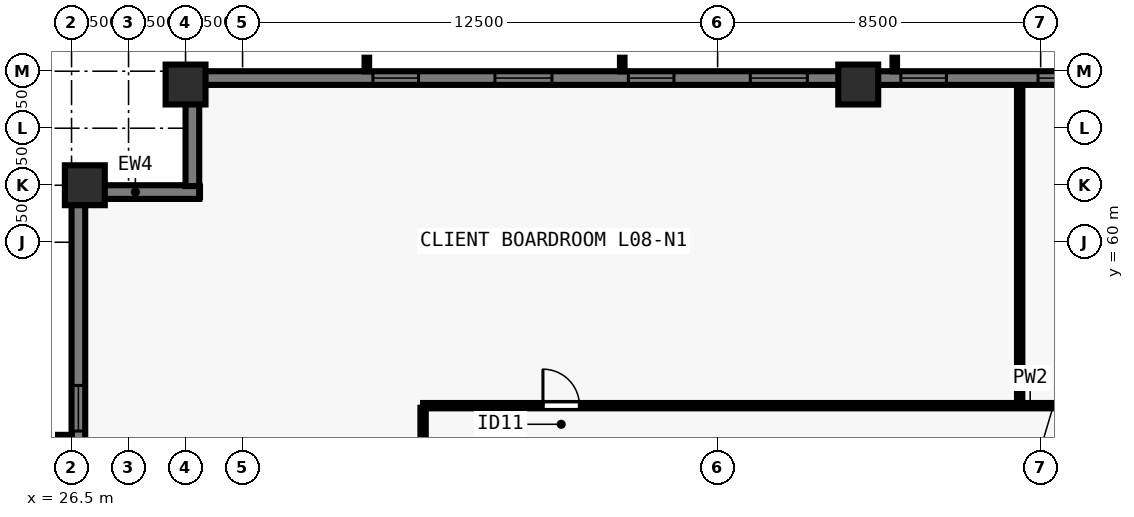
"""IFC4 building model, lengths in metres.
Left out: names, types, materials, properties, quantities, classifications, styles, units other than length and angle.
Written with IfcOpenShell. Run it as: python <this file> out.ifc"""

import sys

from ifc_helpers import new_model, si_unit, direction, frame, frame_2d, origin, origin_2d, place, context, subcontext, project, spatial, rectangle, extrude, element, fill, save


model = new_model("IFC4")
c1 = context("Model", 3, precision=1e-05, world=origin(), true_north=direction((0.0, 1.0)))
c2 = subcontext(c1, "Body", "Model", "MODEL_VIEW")
j1 = project(units=[si_unit("LENGTHUNIT", "METRE"), si_unit("PLANEANGLEUNIT", "RADIAN")], contexts=[c1])
p1 = place(None, origin())
s1 = spatial("IfcSite", under=j1, at=p1, CompositionType="ELEMENT")
p2 = place(p1, origin())
s2 = spatial("IfcBuilding", under=s1, at=p2, CompositionType="ELEMENT")
p3 = place(p2, frame((0.0, 0.0, 34.0)))
s3 = spatial("IfcBuildingStorey", under=s2, at=p3, CompositionType="ELEMENT", Elevation=34.0)
for number, where, z_axis, x_axis in (
    (1, (47.2, 64.15, 0.0), (0.0, 0.0, 1.0), (1.0, 0.0, 0.0)),
    (2, (29.5, 64.15, 0.0), (0.0, 0.0, 1.0), (1.0, 0.0, 0.0)),
    (3, (26.85, 61.5, 0.0), (0.0, 0.0, 1.0), (0.0, 1.0, 0.0)),
):
    element("IfcColumn", number, at=place(p3, frame(where, z_axis=z_axis, x_axis=x_axis)), inside=s3, PredefinedType="COLUMN", context=c2, shape_type="SweptSolid", body=[
        extrude(rectangle(XDim=1.05, YDim=1.05, at=origin_2d()), origin(), (0.0, 0.0, 1.0), 3.5),
    ])
p4 = place(p3, frame((26.68, 16.5, 0.0), z_axis=(0.0, 0.0, 1.0), x_axis=(0.0, 1.0, 0.0)))
e4 = element("IfcWall", 4, at=p4, inside=s3, PredefinedType="SOLIDWALL", context=c2, shape_type="SweptSolid", body=[
    extrude(rectangle(XDim=44.662, YDim=0.36, at=frame_2d((22.331, 0.0))), origin(), (0.0, 0.0, 1.0), 3.28),
])
p5 = place(p4, frame((4.93, 0.0, 0.8)))
e5 = element("IfcOpeningElement", 5, at=p5, cuts=e4, PredefinedType="OPENING", context=c2, shape_type="SweptSolid", body=[
    extrude(rectangle(XDim=1.2, YDim=1.544, at=frame_2d((0.6, 0.772))), frame((0.0, 0.19, 0.0), z_axis=(0.0, -1.0, 0.0), x_axis=(1.0, 0.0, 0.0)), (0.0, 0.0, 1.0), 0.38),
])
p6 = place(p4, frame((8.14, 0.0, 0.8)))
e6 = element("IfcOpeningElement", 6, at=p6, cuts=e4, PredefinedType="OPENING", context=c2, shape_type="SweptSolid", body=[
    extrude(rectangle(XDim=1.5, YDim=1.544, at=frame_2d((0.75, 0.772))), frame((0.0, 0.19, 0.0), z_axis=(0.0, -1.0, 0.0), x_axis=(1.0, 0.0, 0.0)), (0.0, 0.0, 1.0), 0.38),
])
p7 = place(p4, frame((11.65, 0.0, 0.8)))
e7 = element("IfcOpeningElement", 7, at=p7, cuts=e4, PredefinedType="OPENING", context=c2, shape_type="SweptSolid", body=[
    extrude(rectangle(XDim=1.2, YDim=1.544, at=frame_2d((0.6, 0.772))), frame((0.0, 0.19, 0.0), z_axis=(0.0, -1.0, 0.0), x_axis=(1.0, 0.0, 0.0)), (0.0, 0.0, 1.0), 0.38),
])
p8 = place(p4, frame((14.861, 0.0, 0.8)))
e8 = element("IfcOpeningElement", 8, at=p8, cuts=e4, PredefinedType="OPENING", context=c2, shape_type="SweptSolid", body=[
    extrude(rectangle(XDim=1.5, YDim=1.544, at=frame_2d((0.75, 0.772))), frame((0.0, 0.19, 0.0), z_axis=(0.0, -1.0, 0.0), x_axis=(1.0, 0.0, 0.0)), (0.0, 0.0, 1.0), 0.38),
])
p9 = place(p4, frame((18.821, 0.0, 0.8)))
e9 = element("IfcOpeningElement", 9, at=p9, cuts=e4, PredefinedType="OPENING", context=c2, shape_type="SweptSolid", body=[
    extrude(rectangle(XDim=1.2, YDim=1.544, at=frame_2d((0.6, 0.772))), frame((0.0, 0.19, 0.0), z_axis=(0.0, -1.0, 0.0), x_axis=(1.0, 0.0, 0.0)), (0.0, 0.0, 1.0), 0.38),
])
p10 = place(p4, frame((20.731, 0.0, 0.8)))
e10 = element("IfcOpeningElement", 10, at=p10, cuts=e4, PredefinedType="OPENING", context=c2, shape_type="SweptSolid", body=[
    extrude(rectangle(XDim=1.5, YDim=1.544, at=frame_2d((0.75, 0.772))), frame((0.0, 0.19, 0.0), z_axis=(0.0, -1.0, 0.0), x_axis=(1.0, 0.0, 0.0)), (0.0, 0.0, 1.0), 0.38),
])
p11 = place(p4, frame((25.091, 0.0, 0.8)))
e11 = element("IfcOpeningElement", 11, at=p11, cuts=e4, PredefinedType="OPENING", context=c2, shape_type="SweptSolid", body=[
    extrude(rectangle(XDim=1.2, YDim=1.544, at=frame_2d((0.6, 0.772))), frame((0.0, 0.19, 0.0), z_axis=(0.0, -1.0, 0.0), x_axis=(1.0, 0.0, 0.0)), (0.0, 0.0, 1.0), 0.38),
])
p12 = place(p4, frame((28.302, 0.0, 0.8)))
e12 = element("IfcOpeningElement", 12, at=p12, cuts=e4, PredefinedType="OPENING", context=c2, shape_type="SweptSolid", body=[
    extrude(rectangle(XDim=1.5, YDim=1.544, at=frame_2d((0.75, 0.772))), frame((0.0, 0.19, 0.0), z_axis=(0.0, -1.0, 0.0), x_axis=(1.0, 0.0, 0.0)), (0.0, 0.0, 1.0), 0.38),
])
p13 = place(p4, frame((31.812, 0.0, 0.8)))
e13 = element("IfcOpeningElement", 13, at=p13, cuts=e4, PredefinedType="OPENING", context=c2, shape_type="SweptSolid", body=[
    extrude(rectangle(XDim=1.2, YDim=1.544, at=frame_2d((0.6, 0.772))), frame((0.0, 0.19, 0.0), z_axis=(0.0, -1.0, 0.0), x_axis=(1.0, 0.0, 0.0)), (0.0, 0.0, 1.0), 0.38),
])
p14 = place(p4, frame((35.022, 0.0, 0.8)))
e14 = element("IfcOpeningElement", 14, at=p14, cuts=e4, PredefinedType="OPENING", context=c2, shape_type="SweptSolid", body=[
    extrude(rectangle(XDim=1.5, YDim=1.544, at=frame_2d((0.75, 0.772))), frame((0.0, 0.19, 0.0), z_axis=(0.0, -1.0, 0.0), x_axis=(1.0, 0.0, 0.0)), (0.0, 0.0, 1.0), 0.38),
])
p15 = place(p4, frame((38.532, 0.0, 0.8)))
e15 = element("IfcOpeningElement", 15, at=p15, cuts=e4, PredefinedType="OPENING", context=c2, shape_type="SweptSolid", body=[
    extrude(rectangle(XDim=1.2, YDim=1.544, at=frame_2d((0.6, 0.772))), frame((0.0, 0.19, 0.0), z_axis=(0.0, -1.0, 0.0), x_axis=(1.0, 0.0, 0.0)), (0.0, 0.0, 1.0), 0.38),
])
p16 = place(p3, frame((26.5, 61.32, 0.0), z_axis=(0.0, 0.0, 1.0), x_axis=(1.0, 0.0, 0.0)))
e16 = element("IfcWall", 16, at=p16, inside=s3, PredefinedType="SOLIDWALL", context=c2, shape_type="SweptSolid", body=[
    extrude(rectangle(XDim=3.36, YDim=0.36, at=frame_2d((1.68, 0.0))), origin(), (0.0, 0.0, 1.0), 3.28),
])
p17 = place(p3, frame((29.68, 61.478, 0.0), z_axis=(0.0, 0.0, 1.0), x_axis=(0.0, 1.0, 0.0)))
e17 = element("IfcWall", 17, at=p17, inside=s3, PredefinedType="SOLIDWALL", context=c2, shape_type="SweptSolid", body=[
    extrude(rectangle(XDim=2.684, YDim=0.36, at=frame_2d((1.342, 0.0))), origin(), (0.0, 0.0, 1.0), 3.28),
])
p18 = place(p3, frame((29.5, 64.32, 0.0), z_axis=(0.0, 0.0, 1.0), x_axis=(1.0, 0.0, 0.0)))
e18 = element("IfcWall", 18, at=p18, inside=s3, PredefinedType="SOLIDWALL", context=c2, shape_type="SweptSolid", body=[
    extrude(rectangle(XDim=44.662, YDim=0.36, at=frame_2d((22.331, 0.0))), origin(), (0.0, 0.0, 1.0), 3.28),
])
p19 = place(p18, frame((4.93, 0.0, 0.8)))
e19 = element("IfcOpeningElement", 19, at=p19, cuts=e18, PredefinedType="OPENING", context=c2, shape_type="SweptSolid", body=[
    extrude(rectangle(XDim=1.2, YDim=1.544, at=frame_2d((0.6, 0.772))), frame((0.0, 0.19, 0.0), z_axis=(0.0, -1.0, 0.0), x_axis=(1.0, 0.0, 0.0)), (0.0, 0.0, 1.0), 0.38),
])
p20 = place(p18, frame((8.14, 0.0, 0.8)))
e20 = element("IfcOpeningElement", 20, at=p20, cuts=e18, PredefinedType="OPENING", context=c2, shape_type="SweptSolid", body=[
    extrude(rectangle(XDim=1.5, YDim=1.544, at=frame_2d((0.75, 0.772))), frame((0.0, 0.19, 0.0), z_axis=(0.0, -1.0, 0.0), x_axis=(1.0, 0.0, 0.0)), (0.0, 0.0, 1.0), 0.38),
])
p21 = place(p18, frame((11.65, 0.0, 0.8)))
e21 = element("IfcOpeningElement", 21, at=p21, cuts=e18, PredefinedType="OPENING", context=c2, shape_type="SweptSolid", body=[
    extrude(rectangle(XDim=1.2, YDim=1.544, at=frame_2d((0.6, 0.772))), frame((0.0, 0.19, 0.0), z_axis=(0.0, -1.0, 0.0), x_axis=(1.0, 0.0, 0.0)), (0.0, 0.0, 1.0), 0.38),
])
p22 = place(p18, frame((14.861, 0.0, 0.8)))
e22 = element("IfcOpeningElement", 22, at=p22, cuts=e18, PredefinedType="OPENING", context=c2, shape_type="SweptSolid", body=[
    extrude(rectangle(XDim=1.5, YDim=1.544, at=frame_2d((0.75, 0.772))), frame((0.0, 0.19, 0.0), z_axis=(0.0, -1.0, 0.0), x_axis=(1.0, 0.0, 0.0)), (0.0, 0.0, 1.0), 0.38),
])
p23 = place(p18, frame((18.821, 0.0, 0.8)))
e23 = element("IfcOpeningElement", 23, at=p23, cuts=e18, PredefinedType="OPENING", context=c2, shape_type="SweptSolid", body=[
    extrude(rectangle(XDim=1.2, YDim=1.544, at=frame_2d((0.6, 0.772))), frame((0.0, 0.19, 0.0), z_axis=(0.0, -1.0, 0.0), x_axis=(1.0, 0.0, 0.0)), (0.0, 0.0, 1.0), 0.38),
])
p24 = place(p18, frame((22.431, 0.0, 0.8)))
e24 = element("IfcOpeningElement", 24, at=p24, cuts=e18, PredefinedType="OPENING", context=c2, shape_type="SweptSolid", body=[
    extrude(rectangle(XDim=1.5, YDim=1.544, at=frame_2d((0.75, 0.772))), frame((0.0, 0.19, 0.0), z_axis=(0.0, -1.0, 0.0), x_axis=(1.0, 0.0, 0.0)), (0.0, 0.0, 1.0), 0.38),
])
p25 = place(p18, frame((25.091, 0.0, 0.8)))
e25 = element("IfcOpeningElement", 25, at=p25, cuts=e18, PredefinedType="OPENING", context=c2, shape_type="SweptSolid", body=[
    extrude(rectangle(XDim=1.2, YDim=1.544, at=frame_2d((0.6, 0.772))), frame((0.0, 0.19, 0.0), z_axis=(0.0, -1.0, 0.0), x_axis=(1.0, 0.0, 0.0)), (0.0, 0.0, 1.0), 0.38),
])
p26 = place(p18, frame((28.302, 0.0, 0.8)))
e26 = element("IfcOpeningElement", 26, at=p26, cuts=e18, PredefinedType="OPENING", context=c2, shape_type="SweptSolid", body=[
    extrude(rectangle(XDim=1.5, YDim=1.544, at=frame_2d((0.75, 0.772))), frame((0.0, 0.19, 0.0), z_axis=(0.0, -1.0, 0.0), x_axis=(1.0, 0.0, 0.0)), (0.0, 0.0, 1.0), 0.38),
])
p27 = place(p18, frame((31.812, 0.0, 0.8)))
e27 = element("IfcOpeningElement", 27, at=p27, cuts=e18, PredefinedType="OPENING", context=c2, shape_type="SweptSolid", body=[
    extrude(rectangle(XDim=1.2, YDim=1.544, at=frame_2d((0.6, 0.772))), frame((0.0, 0.19, 0.0), z_axis=(0.0, -1.0, 0.0), x_axis=(1.0, 0.0, 0.0)), (0.0, 0.0, 1.0), 0.38),
])
p28 = place(p18, frame((35.022, 0.0, 0.8)))
e28 = element("IfcOpeningElement", 28, at=p28, cuts=e18, PredefinedType="OPENING", context=c2, shape_type="SweptSolid", body=[
    extrude(rectangle(XDim=1.5, YDim=1.544, at=frame_2d((0.75, 0.772))), frame((0.0, 0.19, 0.0), z_axis=(0.0, -1.0, 0.0), x_axis=(1.0, 0.0, 0.0)), (0.0, 0.0, 1.0), 0.38),
])
p29 = place(p18, frame((38.532, 0.0, 0.8)))
e29 = element("IfcOpeningElement", 29, at=p29, cuts=e18, PredefinedType="OPENING", context=c2, shape_type="SweptSolid", body=[
    extrude(rectangle(XDim=1.2, YDim=1.544, at=frame_2d((0.6, 0.772))), frame((0.0, 0.19, 0.0), z_axis=(0.0, -1.0, 0.0), x_axis=(1.0, 0.0, 0.0)), (0.0, 0.0, 1.0), 0.38),
])
p30 = place(p3, frame((35.75, 55.7, 0.0), z_axis=(0.0, 0.0, 1.0), x_axis=(1.0, 0.0, 0.0)))
e30 = element("IfcWall", 30, at=p30, inside=s3, PredefinedType="PARTITIONING", context=c2, shape_type="SweptSolid", body=[
    extrude(rectangle(XDim=32.5, YDim=0.14, at=frame_2d((16.25, 0.0))), origin(), (0.0, 0.0, 1.0), 3.28),
])
p31 = place(p30, frame((3.154, 0.0, 0.0)))
e31 = element("IfcOpeningElement", 31, at=p31, cuts=e30, PredefinedType="OPENING", context=c2, shape_type="SweptSolid", body=[
    extrude(rectangle(XDim=0.96, YDim=2.12, at=frame_2d((0.48, 1.06))), frame((0.0, 0.08, 0.0), z_axis=(0.0, -1.0, 0.0), x_axis=(1.0, 0.0, 0.0)), (0.0, 0.0, 1.0), 0.16),
])
p32 = place(p30, frame((27.834, 0.0, 0.0)))
e32 = element("IfcOpeningElement", 32, at=p32, cuts=e30, PredefinedType="OPENING", context=c2, shape_type="SweptSolid", body=[
    extrude(rectangle(XDim=0.96, YDim=2.12, at=frame_2d((0.48, 1.06))), frame((0.0, 0.08, 0.0), z_axis=(0.0, -1.0, 0.0), x_axis=(1.0, 0.0, 0.0)), (0.0, 0.0, 1.0), 0.16),
])
p33 = place(p3, frame((35.75, 22.355, 0.0), z_axis=(0.0, 0.0, 1.0), x_axis=(0.0, 1.0, 0.0)))
e33 = element("IfcWall", 33, at=p33, inside=s3, PredefinedType="PARTITIONING", context=c2, shape_type="SweptSolid", body=[
    extrude(rectangle(XDim=33.29, YDim=0.14, at=frame_2d((16.645, 0.0))), origin(), (0.0, 0.0, 1.0), 3.28),
])
p34 = place(p33, frame((8.058, 0.0, 0.0)))
e34 = element("IfcOpeningElement", 34, at=p34, cuts=e33, PredefinedType="OPENING", context=c2, shape_type="SweptSolid", body=[
    extrude(rectangle(XDim=0.96, YDim=2.12, at=frame_2d((0.48, 1.06))), frame((0.0, 0.08, 0.0), z_axis=(0.0, -1.0, 0.0), x_axis=(1.0, 0.0, 0.0)), (0.0, 0.0, 1.0), 0.16),
])
p35 = place(p33, frame((24.658, 0.0, 0.0)))
e35 = element("IfcOpeningElement", 35, at=p35, cuts=e33, PredefinedType="OPENING", context=c2, shape_type="SweptSolid", body=[
    extrude(rectangle(XDim=0.96, YDim=2.12, at=frame_2d((0.48, 1.06))), frame((0.0, 0.08, 0.0), z_axis=(0.0, -1.0, 0.0), x_axis=(1.0, 0.0, 0.0)), (0.0, 0.0, 1.0), 0.16),
])
p36 = place(p3, frame((51.448, 55.8, 0.0), z_axis=(0.0, 0.0, 1.0), x_axis=(0.0, 1.0, 0.0)))
e36 = element("IfcWall", 36, at=p36, inside=s3, PredefinedType="PARTITIONING", context=c2, shape_type="SweptSolid", body=[
    extrude(rectangle(XDim=8.28, YDim=0.14, at=frame_2d((4.14, 0.0))), origin(), (0.0, 0.0, 1.0), 3.28),
])
p37 = place(p15, origin())
e37 = element("IfcWindow", 37, at=p37, inside=s3, PartitioningType="SINGLE_PANEL", PredefinedType="WINDOW", context=c2, shape_type="SweptSolid", body=[
    extrude(rectangle(XDim=1.2, YDim=1.544, at=frame_2d((0.6, 0.772))), frame((0.0, -0.05, 0.0), z_axis=(0.0, -1.0, 0.0), x_axis=(1.0, 0.0, 0.0)), (0.0, 0.0, 1.0), 0.06),
])
fill(e15, e37)
p38 = place(p19, origin())
e38 = element("IfcWindow", 38, at=p38, inside=s3, PartitioningType="SINGLE_PANEL", PredefinedType="WINDOW", context=c2, shape_type="SweptSolid", body=[
    extrude(rectangle(XDim=1.2, YDim=1.544, at=frame_2d((0.6, 0.772))), frame((0.0, -0.05, 0.0), z_axis=(0.0, -1.0, 0.0), x_axis=(1.0, 0.0, 0.0)), (0.0, 0.0, 1.0), 0.06),
])
fill(e19, e38)
p39 = place(p20, origin())
e39 = element("IfcWindow", 39, at=p39, inside=s3, PartitioningType="SINGLE_PANEL", PredefinedType="WINDOW", context=c2, shape_type="SweptSolid", body=[
    extrude(rectangle(XDim=1.5, YDim=1.544, at=frame_2d((0.75, 0.772))), frame((0.0, -0.05, 0.0), z_axis=(0.0, -1.0, 0.0), x_axis=(1.0, 0.0, 0.0)), (0.0, 0.0, 1.0), 0.06),
])
fill(e20, e39)
p40 = place(p21, origin())
e40 = element("IfcWindow", 40, at=p40, inside=s3, PartitioningType="SINGLE_PANEL", PredefinedType="WINDOW", context=c2, shape_type="SweptSolid", body=[
    extrude(rectangle(XDim=1.2, YDim=1.544, at=frame_2d((0.6, 0.772))), frame((0.0, -0.05, 0.0), z_axis=(0.0, -1.0, 0.0), x_axis=(1.0, 0.0, 0.0)), (0.0, 0.0, 1.0), 0.06),
])
fill(e21, e40)
p41 = place(p22, origin())
e41 = element("IfcWindow", 41, at=p41, inside=s3, PartitioningType="SINGLE_PANEL", PredefinedType="WINDOW", context=c2, shape_type="SweptSolid", body=[
    extrude(rectangle(XDim=1.5, YDim=1.544, at=frame_2d((0.75, 0.772))), frame((0.0, -0.05, 0.0), z_axis=(0.0, -1.0, 0.0), x_axis=(1.0, 0.0, 0.0)), (0.0, 0.0, 1.0), 0.06),
])
fill(e22, e41)
p42 = place(p23, origin())
e42 = element("IfcWindow", 42, at=p42, inside=s3, PartitioningType="SINGLE_PANEL", PredefinedType="WINDOW", context=c2, shape_type="SweptSolid", body=[
    extrude(rectangle(XDim=1.2, YDim=1.544, at=frame_2d((0.6, 0.772))), frame((0.0, -0.05, 0.0), z_axis=(0.0, -1.0, 0.0), x_axis=(1.0, 0.0, 0.0)), (0.0, 0.0, 1.0), 0.06),
])
fill(e23, e42)
p43 = place(p24, origin())
e43 = element("IfcWindow", 43, at=p43, inside=s3, PartitioningType="SINGLE_PANEL", PredefinedType="WINDOW", context=c2, shape_type="SweptSolid", body=[
    extrude(rectangle(XDim=1.5, YDim=1.544, at=frame_2d((0.75, 0.772))), frame((0.0, -0.05, 0.0), z_axis=(0.0, -1.0, 0.0), x_axis=(1.0, 0.0, 0.0)), (0.0, 0.0, 1.0), 0.06),
])
fill(e24, e43)
p44 = place(p31, origin())
e44 = element("IfcDoor", 44, at=p44, inside=s3, OperationType="SINGLE_SWING_LEFT", PredefinedType="DOOR", context=c2, shape_type="SweptSolid", body=[
    extrude(rectangle(XDim=0.96, YDim=2.12, at=frame_2d((0.48, 1.06))), frame((0.0, 0.025, 0.0), z_axis=(0.0, -1.0, 0.0), x_axis=(1.0, 0.0, 0.0)), (0.0, 0.0, 1.0), 0.05),
])
fill(e31, e44)
save(model, sys.argv[1])
